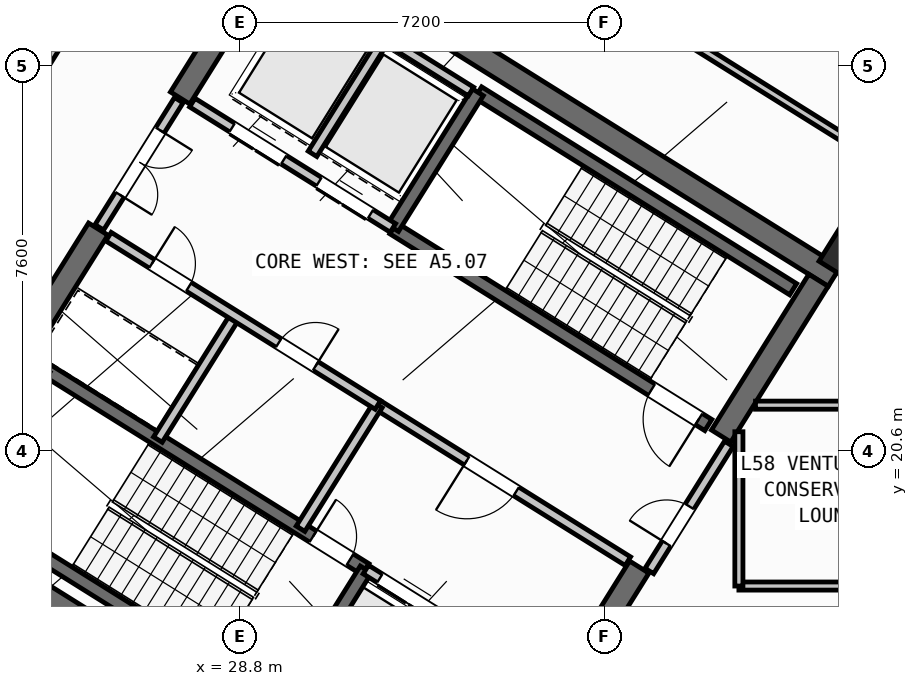
"""IFC4 building model, lengths in metres.
Left out: names, types, materials, properties, quantities, classifications, styles, units other than length and angle.
Written with IfcOpenShell. Run it as: python <this file> out.ifc"""

import sys

from ifc_helpers import new_model, si_unit, direction, frame, frame_2d, origin, origin_2d, place, context, subcontext, project, spatial, rectangle, hollow_rectangle, extrude, source, transform, mapped, element, fill, save


model = new_model("IFC4")
c1 = context("Model", 3, precision=1e-05, world=origin(), true_north=direction((0.0, 1.0)))
c2 = subcontext(c1, "Body", "Model", "MODEL_VIEW")
j1 = project(units=[si_unit("LENGTHUNIT", "METRE"), si_unit("PLANEANGLEUNIT", "RADIAN")], contexts=[c1])
p1 = place(None, origin())
s1 = spatial("IfcSite", under=j1, at=p1, CompositionType="ELEMENT")
p2 = place(p1, origin())
s2 = spatial("IfcBuilding", under=s1, at=p2, CompositionType="ELEMENT")
p3 = place(p2, frame((0.0, 0.0, 229.2)))
s3 = spatial("IfcBuildingStorey", under=s2, at=p3, CompositionType="ELEMENT", Elevation=229.2)
p4 = place(p3, frame((40.531, 24.036, 0.0), z_axis=(0.0, 0.0, 1.0), x_axis=(-0.848048787466, 0.529918157905, 0.0)))
e1 = element("IfcWall", 1, at=p4, inside=s3, PredefinedType="SHEAR", context=c2, shape_type="SweptSolid", body=[
    extrude(rectangle(XDim=13.04, YDim=0.45, at=frame_2d((6.52, 0.0))), origin(), (0.0, 0.0, 1.0), 4.22),
])
p5 = place(p3, frame((33.324, 12.503, 0.0), z_axis=(0.0, 0.0, 1.0), x_axis=(-0.848043529849, 0.529926571782, 0.0)))
e2 = element("IfcWall", 2, at=p5, inside=s3, PredefinedType="SHEAR", context=c2, shape_type="SweptSolid", body=[
    extrude(rectangle(XDim=13.04, YDim=0.45, at=frame_2d((6.52, 0.0))), origin(), (0.0, 0.0, 1.0), 4.22),
])
p6 = place(p3, frame((40.221, 23.965, 0.0), z_axis=(0.0, 0.0, 1.0), x_axis=(-0.529902075036, -0.848058836916, 0.0)))
e3 = element("IfcWall", 3, at=p6, inside=s3, PredefinedType="SHEAR", context=c2, shape_type="SweptSolid", body=[
    extrude(rectangle(XDim=3.625, YDim=0.45, at=frame_2d((1.812, 0.0))), origin(), (0.0, 0.0, 1.0), 4.22),
])
p7 = place(p3, frame((36.683, 18.304, 0.0), z_axis=(0.0, 0.0, 1.0), x_axis=(-0.529904039071, -0.848057609704, 0.0)))
e4 = element("IfcWall", 4, at=p7, inside=s3, PredefinedType="SHEAR", context=c2, shape_type="SweptSolid", body=[
    extrude(rectangle(XDim=6.475, YDim=0.45, at=frame_2d((3.238, 0.0))), origin(), (0.0, 0.0, 1.0), 4.22),
])
p8 = place(p3, frame((29.544, 30.636, 0.0), z_axis=(0.0, 0.0, 1.0), x_axis=(-0.529902075036, -0.848058836916, 0.0)))
e5 = element("IfcWall", 5, at=p8, inside=s3, PredefinedType="SHEAR", context=c2, shape_type="SweptSolid", body=[
    extrude(rectangle(XDim=3.625, YDim=0.45, at=frame_2d((1.812, 0.0))), origin(), (0.0, 0.0, 1.0), 4.22),
])
p9 = place(p3, frame((26.007, 24.976, 0.0), z_axis=(0.0, 0.0, 1.0), x_axis=(-0.529931155655, -0.848040665456, 0.0)))
e6 = element("IfcWall", 6, at=p9, inside=s3, PredefinedType="SHEAR", context=c2, shape_type="SweptSolid", body=[
    extrude(rectangle(XDim=6.475, YDim=0.45, at=frame_2d((3.238, 0.0))), origin(), (0.0, 0.0, 1.0), 4.22),
])
m1 = source(origin(), c2, "Body", "SweptSolid", [
    extrude(hollow_rectangle(XDim=0.8, YDim=0.8, WallThickness=0.032, at=origin_2d()), origin(), (0.0, 0.0, 1.0), 4.5),
])
p10 = place(p3, frame((40.783, 24.469, 0.0), z_axis=(0.0, 0.0, 1.0), x_axis=(-0.848048096156, 0.529919264233, 0.0)))
e7 = element("IfcColumn", 7, at=p10, inside=s3, PredefinedType="COLUMN", context=c2, shape_type="MappedRepresentation", body=[
    mapped(m1, transform((0.0, 0.0, 0.0), scale=1.0)),
])
p11 = place(p3, frame((31.76, 12.183, 0.0), z_axis=(0.0, 0.0, 1.0), x_axis=(-0.848047074256, 0.529920899612, 0.0)))
e8 = element("IfcWall", 8, at=p11, inside=s3, PredefinedType="STANDARD", context=c2, shape_type="SweptSolid", body=[
    extrude(rectangle(XDim=30.652, YDim=0.32, at=frame_2d((15.326, 0.0))), origin(), (0.0, 0.0, 1.0), 4.22),
])
p12 = place(p11, frame((14.966, 0.0, 0.0)))
e9 = element("IfcOpeningElement", 9, at=p12, cuts=e8, PredefinedType="OPENING", context=c2, shape_type="SweptSolid", body=[
    extrude(rectangle(XDim=1.2, YDim=2.15, at=frame_2d((0.6, 1.075))), frame((0.0, 0.17, 0.0), z_axis=(0.0, -1.0, 0.0), x_axis=(1.0, 0.0, 0.0)), (0.0, 0.0, 1.0), 0.34),
])
p13 = place(p11, frame((2.096, 0.0, 0.9)))
e10 = element("IfcOpeningElement", 10, at=p13, cuts=e8, PredefinedType="OPENING", context=c2, shape_type="SweptSolid", body=[
    extrude(rectangle(XDim=1.65, YDim=1.45, at=frame_2d((0.825, 0.725))), frame((0.0, 0.17, 0.0), z_axis=(0.0, -1.0, 0.0), x_axis=(1.0, 0.0, 0.0)), (0.0, 0.0, 1.0), 0.34),
])
p14 = place(p11, frame((6.771, 0.0, 0.9)))
e11 = element("IfcOpeningElement", 11, at=p14, cuts=e8, PredefinedType="OPENING", context=c2, shape_type="SweptSolid", body=[
    extrude(rectangle(XDim=1.65, YDim=1.45, at=frame_2d((0.825, 0.725))), frame((0.0, 0.17, 0.0), z_axis=(0.0, -1.0, 0.0), x_axis=(1.0, 0.0, 0.0)), (0.0, 0.0, 1.0), 0.34),
])
p15 = place(p11, frame((20.283, 0.0, 0.95)))
e12 = element("IfcOpeningElement", 12, at=p15, cuts=e8, PredefinedType="OPENING", context=c2, shape_type="SweptSolid", body=[
    extrude(rectangle(XDim=1.95, YDim=1.35, at=frame_2d((0.975, 0.675))), frame((0.0, 0.17, 0.0), z_axis=(0.0, -1.0, 0.0), x_axis=(1.0, 0.0, 0.0)), (0.0, 0.0, 1.0), 0.34),
])
p16 = place(p11, frame((27.208, 0.0, 1.0)))
e13 = element("IfcOpeningElement", 13, at=p16, cuts=e8, PredefinedType="OPENING", context=c2, shape_type="SweptSolid", body=[
    extrude(rectangle(XDim=0.9, YDim=1.25, at=frame_2d((0.45, 0.625))), frame((0.0, 0.17, 0.0), z_axis=(0.0, -1.0, 0.0), x_axis=(1.0, 0.0, 0.0)), (0.0, 0.0, 1.0), 0.34),
])
p17 = place(p3, frame((29.605, 15.581, 0.0), z_axis=(0.0, 0.0, 1.0), x_axis=(-0.848036911448, 0.529937163087, 0.0)))
e14 = element("IfcWall", 14, at=p17, inside=s3, PredefinedType="SHEAR", context=c2, shape_type="SweptSolid", body=[
    extrude(rectangle(XDim=7.46, YDim=0.26, at=frame_2d((3.73, 0.0))), origin(), (0.0, 0.0, 1.0), 4.22),
])
p18 = place(p3, frame((31.28, 18.261, 0.0), z_axis=(0.0, 0.0, 1.0), x_axis=(-0.848051618787, 0.529913626805, 0.0)))
e15 = element("IfcWall", 15, at=p18, inside=s3, PredefinedType="SHEAR", context=c2, shape_type="SweptSolid", body=[
    extrude(rectangle(XDim=7.46, YDim=0.26, at=frame_2d((3.73, 0.0))), origin(), (0.0, 0.0, 1.0), 4.22),
])
p19 = place(p18, frame((0.36, 0.0, 0.0)))
e16 = element("IfcOpeningElement", 16, at=p19, cuts=e15, PredefinedType="OPENING", context=c2, shape_type="SweptSolid", body=[
    extrude(rectangle(XDim=0.86, YDim=2.05, at=frame_2d((0.43, 1.025))), frame((0.0, 0.14, 0.0), z_axis=(0.0, -1.0, 0.0), x_axis=(1.0, 0.0, 0.0)), (0.0, 0.0, 1.0), 0.28),
])
p20 = place(p3, frame((31.288, 18.256, 0.0), z_axis=(0.0, 0.0, 1.0), x_axis=(-0.529943379326, -0.848033026897, 0.0)))
e17 = element("IfcWall", 17, at=p20, inside=s3, PredefinedType="SHEAR", context=c2, shape_type="SweptSolid", body=[
    extrude(rectangle(XDim=3.16, YDim=0.26, at=frame_2d((1.58, 0.0))), origin(), (0.0, 0.0, 1.0), 4.22),
])
p21 = place(p3, frame((39.721, 23.788, 0.0), z_axis=(0.0, 0.0, 1.0), x_axis=(-0.848054434086, 0.529909121291, 0.0)))
e18 = element("IfcWall", 18, at=p21, inside=s3, PredefinedType="SHEAR", context=c2, shape_type="SweptSolid", body=[
    extrude(rectangle(XDim=7.33, YDim=0.26, at=frame_2d((3.665, 0.0))), origin(), (0.0, 0.0, 1.0), 4.22),
])
p22 = place(p3, frame((38.046, 21.108, 0.0), z_axis=(0.0, 0.0, 1.0), x_axis=(-0.848054434086, 0.529909121291, 0.0)))
e19 = element("IfcWall", 19, at=p22, inside=s3, PredefinedType="SHEAR", context=c2, shape_type="SweptSolid", body=[
    extrude(rectangle(XDim=7.33, YDim=0.26, at=frame_2d((3.665, 0.0))), origin(), (0.0, 0.0, 1.0), 4.22),
])
p23 = place(p22, frame((0.22, 0.0, 0.0)))
e20 = element("IfcOpeningElement", 20, at=p23, cuts=e19, PredefinedType="OPENING", context=c2, shape_type="SweptSolid", body=[
    extrude(rectangle(XDim=1.1, YDim=2.1, at=frame_2d((0.55, 1.05))), frame((0.0, 0.14, 0.0), z_axis=(0.0, -1.0, 0.0), x_axis=(1.0, 0.0, 0.0)), (0.0, 0.0, 1.0), 0.28),
])
p24 = place(p3, frame((33.496, 27.677, 0.0), z_axis=(0.0, 0.0, 1.0), x_axis=(-0.529908658664, -0.84805472316, 0.0)))
e21 = element("IfcWall", 21, at=p24, inside=s3, PredefinedType="SHEAR", context=c2, shape_type="SweptSolid", body=[
    extrude(rectangle(XDim=3.16, YDim=0.26, at=frame_2d((1.58, 0.0))), origin(), (0.0, 0.0, 1.0), 4.22),
])
p25 = place(p3, frame((34.933, 15.978, 0.0), z_axis=(0.0, 0.0, 1.0), x_axis=(-0.848055739377, 0.529907032327, 0.0)))
e22 = element("IfcWall", 22, at=p25, inside=s3, PredefinedType="STANDARD", context=c2, shape_type="SweptSolid", body=[
    extrude(rectangle(XDim=4.298, YDim=0.2, at=frame_2d((2.149, 0.0))), origin(), (0.0, 0.0, 1.0), 4.21),
])
p26 = place(p25, frame((0.448, 0.0, 0.0)))
e23 = element("IfcOpeningElement", 23, at=p26, cuts=e22, PredefinedType="OPENING", context=c2, shape_type="SweptSolid", body=[
    extrude(rectangle(XDim=1.3, YDim=2.2, at=frame_2d((0.65, 1.1))), frame((0.0, 0.11, 0.0), z_axis=(0.0, -1.0, 0.0), x_axis=(1.0, 0.0, 0.0)), (0.0, 0.0, 1.0), 0.22),
])
p27 = place(p25, frame((2.523, 0.0, 0.0)))
e24 = element("IfcOpeningElement", 24, at=p27, cuts=e22, PredefinedType="OPENING", context=c2, shape_type="SweptSolid", body=[
    extrude(rectangle(XDim=1.45, YDim=2.25, at=frame_2d((0.725, 1.125))), frame((0.0, 0.11, 0.0), z_axis=(0.0, -1.0, 0.0), x_axis=(1.0, 0.0, 0.0)), (0.0, 0.0, 1.0), 0.22),
])
p28 = place(p3, frame((36.459, 18.421, 0.0), z_axis=(0.0, 0.0, 1.0), x_axis=(-0.848059591691, 0.529900867089, 0.0)))
e25 = element("IfcWall", 25, at=p28, inside=s3, PredefinedType="STANDARD", context=c2, shape_type="SweptSolid", body=[
    extrude(rectangle(XDim=5.818, YDim=0.2, at=frame_2d((2.909, 0.0))), origin(), (0.0, 0.0, 1.0), 4.21),
])
p29 = place(p28, frame((2.598, 0.0, 0.0)))
e26 = element("IfcOpeningElement", 26, at=p29, cuts=e25, PredefinedType="OPENING", context=c2, shape_type="SweptSolid", body=[
    extrude(rectangle(XDim=1.15, YDim=2.1, at=frame_2d((0.575, 1.05))), frame((0.0, 0.11, 0.0), z_axis=(0.0, -1.0, 0.0), x_axis=(1.0, 0.0, 0.0)), (0.0, 0.0, 1.0), 0.22),
])
p30 = place(p3, frame((31.822, 24.998, 0.0), z_axis=(0.0, 0.0, 1.0), x_axis=(-0.848054125777, 0.529909614701, 0.0)))
e27 = element("IfcWall", 27, at=p30, inside=s3, PredefinedType="STANDARD", context=c2, shape_type="SweptSolid", body=[
    extrude(rectangle(XDim=4.668, YDim=0.2, at=frame_2d((2.334, 0.0))), origin(), (0.0, 0.0, 1.0), 4.21),
])
p31 = place(p30, frame((0.52, 0.0, 0.0)))
e28 = element("IfcOpeningElement", 28, at=p31, cuts=e27, PredefinedType="OPENING", context=c2, shape_type="SweptSolid", body=[
    extrude(rectangle(XDim=1.2, YDim=2.15, at=frame_2d((0.6, 1.075))), frame((0.0, 0.11, 0.0), z_axis=(0.0, -1.0, 0.0), x_axis=(1.0, 0.0, 0.0)), (0.0, 0.0, 1.0), 0.22),
])
p32 = place(p30, frame((2.54, 0.0, 0.0)))
e29 = element("IfcOpeningElement", 29, at=p32, cuts=e27, PredefinedType="OPENING", context=c2, shape_type="SweptSolid", body=[
    extrude(rectangle(XDim=1.2, YDim=2.15, at=frame_2d((0.6, 1.075))), frame((0.0, 0.11, 0.0), z_axis=(0.0, -1.0, 0.0), x_axis=(1.0, 0.0, 0.0)), (0.0, 0.0, 1.0), 0.22),
])
p33 = place(p3, frame((31.645, 28.716, 0.0), z_axis=(0.0, 0.0, 1.0), x_axis=(-0.52986693015, -0.848080795876, 0.0)))
e30 = element("IfcWall", 30, at=p33, inside=s3, PredefinedType="STANDARD", context=c2, shape_type="SweptSolid", body=[
    extrude(rectangle(XDim=2.66, YDim=0.2, at=frame_2d((1.33, 0.0))), origin(), (0.0, 0.0, 1.0), 4.21),
])
p34 = place(p3, frame((33.363, 27.69, 0.0), z_axis=(0.0, 0.0, 1.0), x_axis=(-0.84804957148, 0.529916903215, 0.0)))
e31 = element("IfcWall", 31, at=p34, inside=s3, PredefinedType="STANDARD", context=c2, shape_type="SweptSolid", body=[
    extrude(rectangle(XDim=4.548, YDim=0.2, at=frame_2d((2.274, 0.0))), origin(), (0.0, 0.0, 1.0), 4.21),
])
for number, where, z_axis, x_axis in (
    (32, (31.525, 21.504, 0.0), (0.0, 0.0, 1.0), (-0.53, -0.848, 0.0)),
    (33, (28.71, 23.263, 0.0), (0.0, 0.0, 1.0), (-0.53, -0.848, 0.0)),
):
    element("IfcWall", number, at=place(p3, frame(where, z_axis=z_axis, x_axis=x_axis)), inside=s3, PredefinedType="STANDARD", context=c2, shape_type="SweptSolid", body=[
        extrude(rectangle(XDim=2.88, YDim=0.2, at=frame_2d((1.44, 0.0))), origin(), (0.0, 0.0, 1.0), 4.21),
    ])
p35 = place(p3, frame((31.525, 21.504, 0.0), z_axis=(0.0, 0.0, 1.0), x_axis=(-0.848042066329, 0.529928913853, 0.0)))
e34 = element("IfcWall", 34, at=p35, inside=s3, PredefinedType="STANDARD", context=c2, shape_type="SweptSolid", body=[
    extrude(rectangle(XDim=6.268, YDim=0.2, at=frame_2d((3.134, 0.0))), origin(), (0.0, 0.0, 1.0), 4.21),
])
p36 = place(p35, frame((4.4, 0.0, 0.0)))
e35 = element("IfcOpeningElement", 35, at=p36, cuts=e34, PredefinedType="OPENING", context=c2, shape_type="SweptSolid", body=[
    extrude(rectangle(XDim=0.86, YDim=2.05, at=frame_2d((0.43, 1.025))), frame((0.0, 0.11, 0.0), z_axis=(0.0, -1.0, 0.0), x_axis=(1.0, 0.0, 0.0)), (0.0, 0.0, 1.0), 0.22),
])
p37 = place(p35, frame((1.45, 0.0, 0.0)))
e36 = element("IfcOpeningElement", 36, at=p37, cuts=e34, PredefinedType="OPENING", context=c2, shape_type="SweptSolid", body=[
    extrude(rectangle(XDim=0.86, YDim=2.05, at=frame_2d((0.43, 1.025))), frame((0.0, 0.11, 0.0), z_axis=(0.0, -1.0, 0.0), x_axis=(1.0, 0.0, 0.0)), (0.0, 0.0, 1.0), 0.22),
])
p38 = place(p3, frame((27.596, 27.52, 0.0), z_axis=(0.0, 0.0, 1.0), x_axis=(-0.529865479138, -0.848081702443, 0.0)))
e37 = element("IfcWall", 37, at=p38, inside=s3, PredefinedType="STANDARD", context=c2, shape_type="SweptSolid", body=[
    extrude(rectangle(XDim=2.96, YDim=0.2, at=frame_2d((1.48, 0.0))), origin(), (0.0, 0.0, 1.0), 2.395),
])
p39 = place(p38, frame((0.7, 0.0, 0.0)))
e38 = element("IfcOpeningElement", 38, at=p39, cuts=e37, PredefinedType="OPENING", context=c2, shape_type="SweptSolid", body=[
    extrude(rectangle(XDim=1.5, YDim=2.15, at=frame_2d((0.75, 1.075))), frame((0.0, 0.11, 0.0), z_axis=(0.0, -1.0, 0.0), x_axis=(1.0, 0.0, 0.0)), (0.0, 0.0, 1.0), 0.22),
])
p40 = place(p3, frame((31.239, 38.274, 0.0), z_axis=(0.0, 0.0, 1.0), x_axis=(-0.529921796515, -0.848046513806, 0.0)))
e39 = element("IfcWall", 39, at=p40, inside=s3, PredefinedType="PARTITIONING", context=c2, shape_type="SweptSolid", body=[
    extrude(rectangle(XDim=16.5, YDim=0.16, at=frame_2d((8.25, 0.0))), origin(), (0.0, 0.0, 1.0), 4.21),
])
p41 = place(p3, frame((41.936, 26.012, 0.0), z_axis=(0.0, 0.0, 1.0), x_axis=(-0.848051154596, 0.529914369676, 0.0)))
e40 = element("IfcWall", 40, at=p41, inside=s3, PredefinedType="PARTITIONING", context=c2, shape_type="SweptSolid", body=[
    extrude(rectangle(XDim=15.57, YDim=0.16, at=frame_2d((7.785, 0.0))), origin(), (0.0, 0.0, 1.0), 4.21),
])
p42 = place(p41, frame((10.83, 0.0, 0.0)))
e41 = element("IfcOpeningElement", 41, at=p42, cuts=e40, PredefinedType="OPENING", context=c2, shape_type="SweptSolid", body=[
    extrude(rectangle(XDim=1.0, YDim=2.1, at=frame_2d((0.5, 1.05))), frame((0.0, 0.09, 0.0), z_axis=(0.0, -1.0, 0.0), x_axis=(1.0, 0.0, 0.0)), (0.0, 0.0, 1.0), 0.18),
])
p43 = place(p3, frame((38.451, 20.737, 0.0), z_axis=(0.0, 0.0, 1.0), x_axis=(-0.529924799939, -0.848044637038, 0.0)))
e42 = element("IfcWall", 42, at=p43, inside=s3, PredefinedType="STANDARD", context=c2, shape_type="SweptSolid", body=[
    extrude(rectangle(XDim=2.96, YDim=0.2, at=frame_2d((1.48, 0.0))), origin(), (0.0, 0.0, 1.0), 2.395),
])
p44 = place(p43, frame((1.46, 0.0, 0.0)))
e43 = element("IfcOpeningElement", 43, at=p44, cuts=e42, PredefinedType="OPENING", context=c2, shape_type="SweptSolid", body=[
    extrude(rectangle(XDim=0.86, YDim=2.05, at=frame_2d((0.43, 1.025))), frame((0.0, 0.11, 0.0), z_axis=(0.0, -1.0, 0.0), x_axis=(1.0, 0.0, 0.0)), (0.0, 0.0, 1.0), 0.22),
])
p45 = place(p3, frame((38.65, 17.93, 0.0), z_axis=(0.0, 0.0, 1.0), x_axis=(1.0, 0.0, 0.0)))
e44 = element("IfcWall", 44, at=p45, inside=s3, PredefinedType="PARTITIONING", context=c2, shape_type="SweptSolid", body=[
    extrude(rectangle(XDim=9.95, YDim=0.16, at=frame_2d((4.975, 0.0))), origin(), (0.0, 0.0, 1.0), 4.21),
])
p46 = place(p45, frame((4.475, 0.0, 0.0)))
e45 = element("IfcOpeningElement", 45, at=p46, cuts=e44, PredefinedType="OPENING", context=c2, shape_type="SweptSolid", body=[
    extrude(rectangle(XDim=1.0, YDim=2.1, at=frame_2d((0.5, 1.05))), frame((0.0, 0.09, 0.0), z_axis=(0.0, -1.0, 0.0), x_axis=(1.0, 0.0, 0.0)), (0.0, 0.0, 1.0), 0.18),
])
p47 = place(p3, frame((38.65, 17.93, 0.0), z_axis=(0.0, 0.0, 1.0), x_axis=(0.0, 1.0, 0.0)))
e46 = element("IfcWall", 46, at=p47, inside=s3, PredefinedType="PARTITIONING", context=c2, shape_type="SweptSolid", body=[
    extrude(rectangle(XDim=3.046, YDim=0.16, at=frame_2d((1.523, 0.0))), origin(), (0.0, 0.0, 1.0), 4.21),
])
p48 = place(p3, frame((38.978, 21.5, 0.0), z_axis=(0.0, 0.0, 1.0), x_axis=(1.0, 0.0, 0.0)))
e47 = element("IfcWall", 47, at=p48, inside=s3, PredefinedType="PARTITIONING", context=c2, shape_type="SweptSolid", body=[
    extrude(rectangle(XDim=7.336, YDim=0.16, at=frame_2d((3.668, 0.0))), origin(), (0.0, 0.0, 1.0), 4.21),
])
m2 = source(origin(), c2, "Body", "SweptSolid", [
    extrude(rectangle(XDim=0.86, YDim=2.05, at=frame_2d((0.43, 1.025))), frame((0.0, 0.025, 0.0), z_axis=(0.0, -1.0, 0.0), x_axis=(1.0, 0.0, 0.0)), (0.0, 0.0, 1.0), 0.05),
])
p49 = place(p19, frame((0.86, 0.0, 0.0), z_axis=(0.0, 0.0, 1.0), x_axis=(-1.0, 0.0, 0.0)))
e48 = element("IfcDoor", 48, at=p49, inside=s3, OperationType="SINGLE_SWING_LEFT", PredefinedType="DOOR", context=c2, shape_type="MappedRepresentation", body=[
    mapped(m2, transform((0.0, 0.0, 0.0), scale=1.0)),
])
fill(e16, e48)
m3 = source(origin(), c2, "Body", "SweptSolid", [
    extrude(rectangle(XDim=1.1, YDim=2.1, at=frame_2d((0.55, 1.05))), frame((0.0, 0.025, 0.0), z_axis=(0.0, -1.0, 0.0), x_axis=(1.0, 0.0, 0.0)), (0.0, 0.0, 1.0), 0.05),
])
p50 = place(p23, origin())
e49 = element("IfcDoor", 49, at=p50, inside=s3, OperationType="SINGLE_SWING_LEFT", PredefinedType="DOOR", context=c2, shape_type="MappedRepresentation", body=[
    mapped(m3, transform((0.0, 0.0, 0.0), scale=1.0)),
])
fill(e20, e49)
m4 = source(origin(), c2, "Body", "SweptSolid", [
    extrude(rectangle(XDim=1.15, YDim=2.1, at=frame_2d((0.575, 1.05))), frame((0.0, 0.025, 0.0), z_axis=(0.0, -1.0, 0.0), x_axis=(1.0, 0.0, 0.0)), (0.0, 0.0, 1.0), 0.05),
])
p51 = place(p29, origin())
e50 = element("IfcDoor", 50, at=p51, inside=s3, OperationType="SINGLE_SWING_RIGHT", PredefinedType="DOOR", context=c2, shape_type="MappedRepresentation", body=[
    mapped(m4, transform((0.0, 0.0, 0.0), scale=1.0)),
])
fill(e26, e50)
m5 = source(origin(), c2, "Body", "SweptSolid", [
    extrude(rectangle(XDim=1.45, YDim=2.25, at=frame_2d((0.725, 1.125))), frame((0.0, 0.025, 0.0), z_axis=(0.0, -1.0, 0.0), x_axis=(1.0, 0.0, 0.0)), (0.0, 0.0, 1.0), 0.05),
])
p52 = place(p27, origin())
e51 = element("IfcDoor", 51, at=p52, inside=s3, OperationType="DOUBLE_DOOR_SLIDING", PredefinedType="DOOR", context=c2, shape_type="MappedRepresentation", body=[
    mapped(m5, transform((0.0, 0.0, 0.0), scale=1.0)),
])
fill(e24, e51)
m6 = source(origin(), c2, "Body", "SweptSolid", [
    extrude(rectangle(XDim=1.2, YDim=2.15, at=frame_2d((0.6, 1.075))), frame((0.0, 0.025, 0.0), z_axis=(0.0, -1.0, 0.0), x_axis=(1.0, 0.0, 0.0)), (0.0, 0.0, 1.0), 0.05),
])
p53 = place(p31, origin())
e52 = element("IfcDoor", 52, at=p53, inside=s3, OperationType="DOUBLE_DOOR_SLIDING", PredefinedType="DOOR", context=c2, shape_type="MappedRepresentation", body=[
    mapped(m6, transform((0.0, 0.0, 0.0), scale=1.0)),
])
fill(e28, e52)
p54 = place(p32, origin())
e53 = element("IfcDoor", 53, at=p54, inside=s3, OperationType="DOUBLE_DOOR_SLIDING", PredefinedType="DOOR", context=c2, shape_type="MappedRepresentation", body=[
    mapped(m6, transform((0.0, 0.0, 0.0), scale=1.0)),
])
fill(e29, e53)
p55 = place(p36, frame((0.86, 0.0, 0.0), z_axis=(0.0, 0.0, 1.0), x_axis=(-1.0, 0.0, 0.0)))
e54 = element("IfcDoor", 54, at=p55, inside=s3, OperationType="SINGLE_SWING_LEFT", PredefinedType="DOOR", context=c2, shape_type="MappedRepresentation", body=[
    mapped(m2, transform((0.0, 0.0, 0.0), scale=1.0)),
])
fill(e35, e54)
p56 = place(p37, frame((0.86, 0.0, 0.0), z_axis=(0.0, 0.0, 1.0), x_axis=(-1.0, 0.0, 0.0)))
e55 = element("IfcDoor", 55, at=p56, inside=s3, OperationType="SINGLE_SWING_RIGHT", PredefinedType="DOOR", context=c2, shape_type="MappedRepresentation", body=[
    mapped(m2, transform((0.0, 0.0, 0.0), scale=1.0)),
])
fill(e36, e55)
m7 = source(origin(), c2, "Body", "SweptSolid", [
    extrude(rectangle(XDim=1.5, YDim=2.15, at=frame_2d((0.75, 1.075))), frame((0.0, 0.025, 0.0), z_axis=(0.0, -1.0, 0.0), x_axis=(1.0, 0.0, 0.0)), (0.0, 0.0, 1.0), 0.05),
])
p57 = place(p39, origin())
e56 = element("IfcDoor", 56, at=p57, inside=s3, OperationType="DOUBLE_DOOR_SINGLE_SWING", PredefinedType="DOOR", context=c2, shape_type="MappedRepresentation", body=[
    mapped(m7, transform((0.0, 0.0, 0.0), scale=1.0)),
])
fill(e38, e56)
p58 = place(p44, frame((0.86, 0.0, 0.0), z_axis=(0.0, 0.0, 1.0), x_axis=(-1.0, 0.0, 0.0)))
e57 = element("IfcDoor", 57, at=p58, inside=s3, OperationType="SINGLE_SWING_LEFT", PredefinedType="DOOR", context=c2, shape_type="MappedRepresentation", body=[
    mapped(m2, transform((0.0, 0.0, 0.0), scale=1.0)),
])
fill(e43, e57)
save(model, sys.argv[1])
